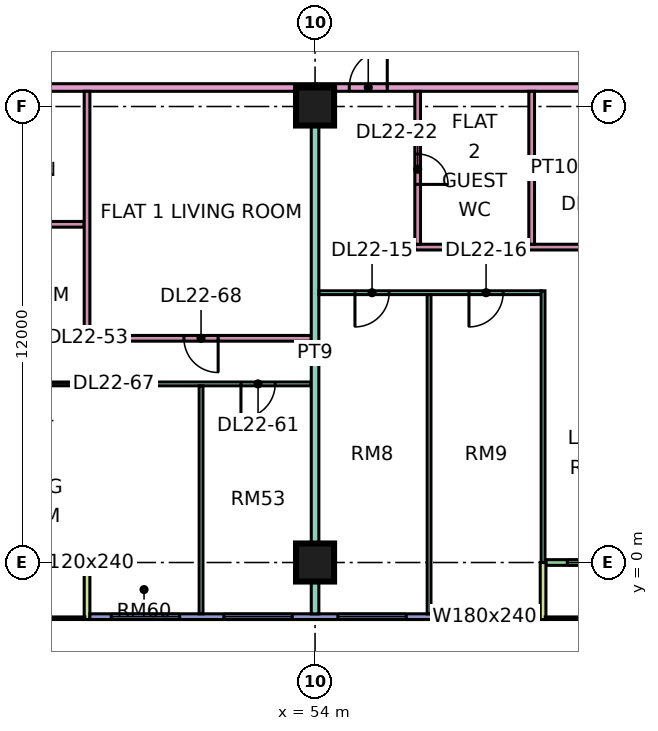
"""IFC4 building model, lengths in metres.
Left out: names, types, materials, properties, quantities, classifications, styles, units other than length and angle.
Written with IfcOpenShell. Run it as: python <this file> out.ifc"""

import sys

from ifc_helpers import new_model, si_unit, direction, frame, frame_2d, origin, origin_2d, place, context, subcontext, project, spatial, rectangle, extrude, element, fill, save


model = new_model("IFC4")
c1 = context("Model", 3, precision=1e-05, world=origin(), true_north=direction((0.0, 1.0)))
c2 = subcontext(c1, "Body", "Model", "MODEL_VIEW")
j1 = project(units=[si_unit("LENGTHUNIT", "METRE"), si_unit("PLANEANGLEUNIT", "RADIAN")], contexts=[c1])
p1 = place(None, origin())
s1 = spatial("IfcSite", under=j1, at=p1, CompositionType="ELEMENT")
p2 = place(p1, origin())
s2 = spatial("IfcBuilding", under=s1, at=p2, CompositionType="ELEMENT")
p3 = place(p2, frame((0.0, 0.0, 99.4)))
s3 = spatial("IfcBuildingStorey", under=s2, at=p3, CompositionType="ELEMENT", Elevation=99.4)
for number, where, z_axis, x_axis in (
    (1, (54.0, 0.0, 0.0), (0.0, 0.0, 1.0), (1.0, 0.0, 0.0)),
    (2, (54.0, 12.0, 0.0), (0.0, 0.0, 1.0), (1.0, 0.0, 0.0)),
):
    element("IfcColumn", number, at=place(p3, frame(where, z_axis=z_axis, x_axis=x_axis)), inside=s3, PredefinedType="COLUMN", context=c2, shape_type="SweptSolid", body=[
        extrude(rectangle(XDim=1.0, YDim=1.0, at=origin_2d()), origin(), (0.0, 0.0, 1.0), 3.75),
    ])
p4 = place(p3, frame((36.075, 0.0, 0.0), z_axis=(0.0, 0.0, 1.0), x_axis=(1.0, 0.0, 0.0)))
e3 = element("IfcWall", 3, at=p4, inside=s3, PredefinedType="SOLIDWALL", context=c2, shape_type="SweptSolid", body=[
    extrude(rectangle(XDim=11.85, YDim=0.15, at=frame_2d((5.925, 0.0))), origin(), (0.0, 0.0, 1.0), 3.35),
])
p5 = place(p4, frame((1.125, 0.0, 0.0)))
e4 = element("IfcOpeningElement", 4, at=p5, cuts=e3, PredefinedType="OPENING", context=c2, shape_type="SweptSolid", body=[
    extrude(rectangle(XDim=1.2, YDim=2.4, at=frame_2d((0.6, 1.2))), frame((0.0, 0.085, 0.0), z_axis=(0.0, -1.0, 0.0), x_axis=(1.0, 0.0, 0.0)), (0.0, 0.0, 1.0), 0.17),
])
p6 = place(p4, frame((3.525, 0.0, 0.45)))
e5 = element("IfcOpeningElement", 5, at=p6, cuts=e3, PredefinedType="OPENING", context=c2, shape_type="SweptSolid", body=[
    extrude(rectangle(XDim=1.8, YDim=2.4, at=frame_2d((0.9, 1.2))), frame((0.0, 0.085, 0.0), z_axis=(0.0, -1.0, 0.0), x_axis=(1.0, 0.0, 0.0)), (0.0, 0.0, 1.0), 0.17),
])
p7 = place(p4, frame((6.525, 0.0, 0.45)))
e6 = element("IfcOpeningElement", 6, at=p7, cuts=e3, PredefinedType="OPENING", context=c2, shape_type="SweptSolid", body=[
    extrude(rectangle(XDim=1.2, YDim=2.4, at=frame_2d((0.6, 1.2))), frame((0.0, 0.085, 0.0), z_axis=(0.0, -1.0, 0.0), x_axis=(1.0, 0.0, 0.0)), (0.0, 0.0, 1.0), 0.17),
])
p8 = place(p4, frame((10.087, 0.0, 0.45)))
e7 = element("IfcOpeningElement", 7, at=p8, cuts=e3, PredefinedType="OPENING", context=c2, shape_type="SweptSolid", body=[
    extrude(rectangle(XDim=1.2, YDim=2.4, at=frame_2d((0.6, 1.2))), frame((0.0, 0.085, 0.0), z_axis=(0.0, -1.0, 0.0), x_axis=(1.0, 0.0, 0.0)), (0.0, 0.0, 1.0), 0.17),
])
p9 = place(p3, frame((48.0, -1.5, 0.0), z_axis=(0.0, 0.0, 1.0), x_axis=(0.0, 1.0, 0.0)))
e8 = element("IfcWall", 8, at=p9, inside=s3, PredefinedType="SOLIDWALL", context=c2, shape_type="SweptSolid", body=[
    extrude(rectangle(XDim=1.5, YDim=0.15, at=frame_2d((0.75, 0.0))), origin(), (0.0, 0.0, 1.0), 3.35),
])
p10 = place(p3, frame((48.075, -1.425, 0.0), z_axis=(0.0, 0.0, 1.0), x_axis=(1.0, 0.0, 0.0)))
e9 = element("IfcWall", 9, at=p10, inside=s3, PredefinedType="SOLIDWALL", context=c2, shape_type="SweptSolid", body=[
    extrude(rectangle(XDim=11.85, YDim=0.15, at=frame_2d((5.925, 0.0))), origin(), (0.0, 0.0, 1.0), 3.35),
])
p11 = place(p10, frame((0.562, 0.0, 0.45)))
e10 = element("IfcOpeningElement", 10, at=p11, cuts=e9, PredefinedType="OPENING", context=c2, shape_type="SweptSolid", body=[
    extrude(rectangle(XDim=1.8, YDim=2.4, at=frame_2d((0.9, 1.2))), frame((0.0, 0.085, 0.0), z_axis=(0.0, -1.0, 0.0), x_axis=(1.0, 0.0, 0.0)), (0.0, 0.0, 1.0), 0.17),
])
p12 = place(p10, frame((3.525, 0.0, 0.45)))
e11 = element("IfcOpeningElement", 11, at=p12, cuts=e9, PredefinedType="OPENING", context=c2, shape_type="SweptSolid", body=[
    extrude(rectangle(XDim=1.8, YDim=2.4, at=frame_2d((0.9, 1.2))), frame((0.0, 0.085, 0.0), z_axis=(0.0, -1.0, 0.0), x_axis=(1.0, 0.0, 0.0)), (0.0, 0.0, 1.0), 0.17),
])
p13 = place(p10, frame((6.525, 0.0, 0.45)))
e12 = element("IfcOpeningElement", 12, at=p13, cuts=e9, PredefinedType="OPENING", context=c2, shape_type="SweptSolid", body=[
    extrude(rectangle(XDim=1.8, YDim=2.4, at=frame_2d((0.9, 1.2))), frame((0.0, 0.085, 0.0), z_axis=(0.0, -1.0, 0.0), x_axis=(1.0, 0.0, 0.0)), (0.0, 0.0, 1.0), 0.17),
])
p14 = place(p10, frame((9.488, 0.0, 0.45)))
e13 = element("IfcOpeningElement", 13, at=p14, cuts=e9, PredefinedType="OPENING", context=c2, shape_type="SweptSolid", body=[
    extrude(rectangle(XDim=1.8, YDim=2.4, at=frame_2d((0.9, 1.2))), frame((0.0, 0.085, 0.0), z_axis=(0.0, -1.0, 0.0), x_axis=(1.0, 0.0, 0.0)), (0.0, 0.0, 1.0), 0.17),
])
p15 = place(p3, frame((60.075, 0.0, 0.0), z_axis=(0.0, 0.0, 1.0), x_axis=(1.0, 0.0, 0.0)))
e14 = element("IfcWall", 14, at=p15, inside=s3, PredefinedType="SOLIDWALL", context=c2, shape_type="SweptSolid", body=[
    extrude(rectangle(XDim=10.35, YDim=0.15, at=frame_2d((5.175, 0.0))), origin(), (0.0, 0.0, 1.0), 3.35),
])
p16 = place(p15, frame((0.562, 0.0, 0.45)))
e15 = element("IfcOpeningElement", 15, at=p16, cuts=e14, PredefinedType="OPENING", context=c2, shape_type="SweptSolid", body=[
    extrude(rectangle(XDim=1.2, YDim=2.4, at=frame_2d((0.6, 1.2))), frame((0.0, 0.085, 0.0), z_axis=(0.0, -1.0, 0.0), x_axis=(1.0, 0.0, 0.0)), (0.0, 0.0, 1.0), 0.17),
])
p17 = place(p15, frame((4.125, 0.0, 0.0)))
e16 = element("IfcOpeningElement", 16, at=p17, cuts=e14, PredefinedType="OPENING", context=c2, shape_type="SweptSolid", body=[
    extrude(rectangle(XDim=1.2, YDim=2.4, at=frame_2d((0.6, 1.2))), frame((0.0, 0.085, 0.0), z_axis=(0.0, -1.0, 0.0), x_axis=(1.0, 0.0, 0.0)), (0.0, 0.0, 1.0), 0.17),
])
p18 = place(p15, frame((6.525, 0.0, 0.45)))
e17 = element("IfcOpeningElement", 17, at=p18, cuts=e14, PredefinedType="OPENING", context=c2, shape_type="SweptSolid", body=[
    extrude(rectangle(XDim=1.8, YDim=2.4, at=frame_2d((0.9, 1.2))), frame((0.0, 0.085, 0.0), z_axis=(0.0, -1.0, 0.0), x_axis=(1.0, 0.0, 0.0)), (0.0, 0.0, 1.0), 0.17),
])
p19 = place(p15, frame((9.188, 0.0, 0.45)))
e18 = element("IfcOpeningElement", 18, at=p19, cuts=e14, PredefinedType="OPENING", context=c2, shape_type="SweptSolid", body=[
    extrude(rectangle(XDim=0.9, YDim=2.4, at=frame_2d((0.45, 1.2))), frame((0.0, 0.085, 0.0), z_axis=(0.0, -1.0, 0.0), x_axis=(1.0, 0.0, 0.0)), (0.0, 0.0, 1.0), 0.17),
])
p20 = place(p3, frame((60.0, -1.5, 0.0), z_axis=(0.0, 0.0, 1.0), x_axis=(0.0, 1.0, 0.0)))
e19 = element("IfcWall", 19, at=p20, inside=s3, PredefinedType="SOLIDWALL", context=c2, shape_type="SweptSolid", body=[
    extrude(rectangle(XDim=1.5, YDim=0.15, at=frame_2d((0.75, 0.0))), origin(), (0.0, 0.0, 1.0), 3.35),
])
p21 = place(p3, frame((33.05, 4.7, 0.0), z_axis=(0.0, 0.0, 1.0), x_axis=(1.0, 0.0, 0.0)))
e20 = element("IfcWall", 20, at=p21, inside=s3, PredefinedType="PARTITIONING", context=c2, shape_type="SweptSolid", body=[
    extrude(rectangle(XDim=20.85, YDim=0.1, at=frame_2d((10.425, 0.0))), origin(), (0.0, 0.0, 1.0), 3.35),
])
p22 = place(p21, frame((1.0, 0.0, 0.0)))
e21 = element("IfcOpeningElement", 21, at=p22, cuts=e20, PredefinedType="OPENING", context=c2, shape_type="SweptSolid", body=[
    extrude(rectangle(XDim=0.9, YDim=2.1, at=frame_2d((0.45, 1.05))), frame((0.0, 0.06, 0.0), z_axis=(0.0, -1.0, 0.0), x_axis=(1.0, 0.0, 0.0)), (0.0, 0.0, 1.0), 0.12),
])
p23 = place(p21, frame((4.0, 0.0, 0.0)))
e22 = element("IfcOpeningElement", 22, at=p23, cuts=e20, PredefinedType="OPENING", context=c2, shape_type="SweptSolid", body=[
    extrude(rectangle(XDim=0.9, YDim=2.1, at=frame_2d((0.45, 1.05))), frame((0.0, 0.06, 0.0), z_axis=(0.0, -1.0, 0.0), x_axis=(1.0, 0.0, 0.0)), (0.0, 0.0, 1.0), 0.12),
])
p24 = place(p21, frame((7.0, 0.0, 0.0)))
e23 = element("IfcOpeningElement", 23, at=p24, cuts=e20, PredefinedType="OPENING", context=c2, shape_type="SweptSolid", body=[
    extrude(rectangle(XDim=0.9, YDim=2.1, at=frame_2d((0.45, 1.05))), frame((0.0, 0.06, 0.0), z_axis=(0.0, -1.0, 0.0), x_axis=(1.0, 0.0, 0.0)), (0.0, 0.0, 1.0), 0.12),
])
p25 = place(p21, frame((19.0, 0.0, 0.0)))
e24 = element("IfcOpeningElement", 24, at=p25, cuts=e20, PredefinedType="OPENING", context=c2, shape_type="SweptSolid", body=[
    extrude(rectangle(XDim=0.9, YDim=2.1, at=frame_2d((0.45, 1.05))), frame((0.0, 0.06, 0.0), z_axis=(0.0, -1.0, 0.0), x_axis=(1.0, 0.0, 0.0)), (0.0, 0.0, 1.0), 0.12),
])
p26 = place(p21, frame((13.0, 0.0, 0.0)))
e25 = element("IfcOpeningElement", 25, at=p26, cuts=e20, PredefinedType="OPENING", context=c2, shape_type="SweptSolid", body=[
    extrude(rectangle(XDim=0.9, YDim=2.1, at=frame_2d((0.45, 1.05))), frame((0.0, 0.06, 0.0), z_axis=(0.0, -1.0, 0.0), x_axis=(1.0, 0.0, 0.0)), (0.0, 0.0, 1.0), 0.12),
])
p27 = place(p3, frame((40.65, 12.5, 0.0), z_axis=(0.0, 0.0, 1.0), x_axis=(1.0, 0.0, 0.0)))
e26 = element("IfcWall", 26, at=p27, inside=s3, PredefinedType="PARTITIONING", context=c2, shape_type="SweptSolid", body=[
    extrude(rectangle(XDim=31.276, YDim=0.2, at=frame_2d((15.638, 0.0))), origin(), (0.0, 0.0, 1.0), 3.35),
])
p28 = place(p27, frame((14.25, 0.0, 0.0)))
e27 = element("IfcOpeningElement", 27, at=p28, cuts=e26, PredefinedType="OPENING", context=c2, shape_type="SweptSolid", body=[
    extrude(rectangle(XDim=1.0, YDim=2.1, at=frame_2d((0.5, 1.05))), frame((0.0, 0.11, 0.0), z_axis=(0.0, -1.0, 0.0), x_axis=(1.0, 0.0, 0.0)), (0.0, 0.0, 1.0), 0.22),
])
p29 = place(p27, frame((1.05, 0.0, 0.0)))
e28 = element("IfcOpeningElement", 28, at=p29, cuts=e26, PredefinedType="OPENING", context=c2, shape_type="SweptSolid", body=[
    extrude(rectangle(XDim=1.0, YDim=2.1, at=frame_2d((0.5, 1.05))), frame((0.0, 0.11, 0.0), z_axis=(0.0, -1.0, 0.0), x_axis=(1.0, 0.0, 0.0)), (0.0, 0.0, 1.0), 0.22),
])
p30 = place(p3, frame((43.575, 5.9, 0.0), z_axis=(0.0, 0.0, 1.0), x_axis=(1.0, 0.0, 0.0)))
e29 = element("IfcWall", 29, at=p30, inside=s3, PredefinedType="PARTITIONING", context=c2, shape_type="SweptSolid", body=[
    extrude(rectangle(XDim=10.325, YDim=0.15, at=frame_2d((5.163, 0.0))), origin(), (0.0, 0.0, 1.0), 3.35),
])
p31 = place(p30, frame((1.825, 0.0, 0.0)))
e30 = element("IfcOpeningElement", 30, at=p31, cuts=e29, PredefinedType="OPENING", context=c2, shape_type="SweptSolid", body=[
    extrude(rectangle(XDim=0.8, YDim=2.1, at=frame_2d((0.4, 1.05))), frame((0.0, 0.085, 0.0), z_axis=(0.0, -1.0, 0.0), x_axis=(1.0, 0.0, 0.0)), (0.0, 0.0, 1.0), 0.17),
])
p32 = place(p30, frame((6.975, 0.0, 0.0)))
e31 = element("IfcOpeningElement", 31, at=p32, cuts=e29, PredefinedType="OPENING", context=c2, shape_type="SweptSolid", body=[
    extrude(rectangle(XDim=0.9, YDim=2.1, at=frame_2d((0.45, 1.05))), frame((0.0, 0.085, 0.0), z_axis=(0.0, -1.0, 0.0), x_axis=(1.0, 0.0, 0.0)), (0.0, 0.0, 1.0), 0.17),
])
p33 = place(p3, frame((43.725, 8.9, 0.0), z_axis=(0.0, 0.0, 1.0), x_axis=(1.0, 0.0, 0.0)))
e32 = element("IfcWall", 32, at=p33, inside=s3, PredefinedType="PARTITIONING", context=c2, shape_type="SweptSolid", body=[
    extrude(rectangle(XDim=4.2, YDim=0.15, at=frame_2d((2.1, 0.0))), origin(), (0.0, 0.0, 1.0), 3.35),
])
p34 = place(p3, frame((48.0, 5.975, 0.0), z_axis=(0.0, 0.0, 1.0), x_axis=(0.0, 1.0, 0.0)))
e33 = element("IfcWall", 33, at=p34, inside=s3, PredefinedType="PARTITIONING", context=c2, shape_type="SweptSolid", body=[
    extrude(rectangle(XDim=6.425, YDim=0.15, at=frame_2d((3.212, 0.0))), origin(), (0.0, 0.0, 1.0), 3.35),
])
p35 = place(p3, frame((51.0, -1.35, 0.0), z_axis=(0.0, 0.0, 1.0), x_axis=(0.0, 1.0, 0.0)))
e34 = element("IfcWall", 34, at=p35, inside=s3, PredefinedType="PARTITIONING", context=c2, shape_type="SweptSolid", body=[
    extrude(rectangle(XDim=6.0, YDim=0.1, at=frame_2d((3.0, 0.0))), origin(), (0.0, 0.0, 1.0), 3.35),
])
p36 = place(p3, frame((54.0, -1.351, 0.0), z_axis=(0.0, 0.0, 1.0), x_axis=(0.0, 1.0, 0.0)))
e35 = element("IfcWall", 35, at=p36, inside=s3, PredefinedType="PARTITIONING", context=c2, shape_type="SweptSolid", body=[
    extrude(rectangle(XDim=13.751, YDim=0.2, at=frame_2d((6.875, 0.0))), origin(), (0.0, 0.0, 1.0), 3.35),
])
p37 = place(p3, frame((54.1, 7.1, 0.0), z_axis=(0.0, 0.0, 1.0), x_axis=(1.0, 0.0, 0.0)))
e36 = element("IfcWall", 36, at=p37, inside=s3, PredefinedType="PARTITIONING", context=c2, shape_type="SweptSolid", body=[
    extrude(rectangle(XDim=5.85, YDim=0.1, at=frame_2d((2.925, 0.0))), origin(), (0.0, 0.0, 1.0), 3.35),
])
p38 = place(p37, frame((0.95, 0.0, 0.0)))
e37 = element("IfcOpeningElement", 37, at=p38, cuts=e36, PredefinedType="OPENING", context=c2, shape_type="SweptSolid", body=[
    extrude(rectangle(XDim=0.9, YDim=2.1, at=frame_2d((0.45, 1.05))), frame((0.0, 0.06, 0.0), z_axis=(0.0, -1.0, 0.0), x_axis=(1.0, 0.0, 0.0)), (0.0, 0.0, 1.0), 0.12),
])
p39 = place(p37, frame((3.95, 0.0, 0.0)))
e38 = element("IfcOpeningElement", 38, at=p39, cuts=e36, PredefinedType="OPENING", context=c2, shape_type="SweptSolid", body=[
    extrude(rectangle(XDim=0.9, YDim=2.1, at=frame_2d((0.45, 1.05))), frame((0.0, 0.06, 0.0), z_axis=(0.0, -1.0, 0.0), x_axis=(1.0, 0.0, 0.0)), (0.0, 0.0, 1.0), 0.12),
])
p40 = place(p3, frame((56.625, 8.3, 0.0), z_axis=(0.0, 0.0, 1.0), x_axis=(1.0, 0.0, 0.0)))
e39 = element("IfcWall", 39, at=p40, inside=s3, PredefinedType="PARTITIONING", context=c2, shape_type="SweptSolid", body=[
    extrude(rectangle(XDim=16.725, YDim=0.15, at=frame_2d((8.363, 0.0))), origin(), (0.0, 0.0, 1.0), 3.35),
])
p41 = place(p40, frame((4.525, 0.0, 0.0)))
e40 = element("IfcOpeningElement", 40, at=p41, cuts=e39, PredefinedType="OPENING", context=c2, shape_type="SweptSolid", body=[
    extrude(rectangle(XDim=0.8, YDim=2.1, at=frame_2d((0.4, 1.05))), frame((0.0, 0.085, 0.0), z_axis=(0.0, -1.0, 0.0), x_axis=(1.0, 0.0, 0.0)), (0.0, 0.0, 1.0), 0.17),
])
p42 = place(p40, frame((11.625, 0.0, 0.0)))
e41 = element("IfcOpeningElement", 41, at=p42, cuts=e39, PredefinedType="OPENING", context=c2, shape_type="SweptSolid", body=[
    extrude(rectangle(XDim=0.9, YDim=2.1, at=frame_2d((0.45, 1.05))), frame((0.0, 0.085, 0.0), z_axis=(0.0, -1.0, 0.0), x_axis=(1.0, 0.0, 0.0)), (0.0, 0.0, 1.0), 0.17),
])
p43 = place(p40, frame((7.375, 0.0, 0.0)))
e42 = element("IfcOpeningElement", 42, at=p43, cuts=e39, PredefinedType="OPENING", context=c2, shape_type="SweptSolid", body=[
    extrude(rectangle(XDim=0.8, YDim=2.1, at=frame_2d((0.4, 1.05))), frame((0.0, 0.085, 0.0), z_axis=(0.0, -1.0, 0.0), x_axis=(1.0, 0.0, 0.0)), (0.0, 0.0, 1.0), 0.17),
])
p44 = place(p3, frame((56.7, 8.375, 0.0), z_axis=(0.0, 0.0, 1.0), x_axis=(0.0, 1.0, 0.0)))
e43 = element("IfcWall", 43, at=p44, inside=s3, PredefinedType="PARTITIONING", context=c2, shape_type="SweptSolid", body=[
    extrude(rectangle(XDim=4.025, YDim=0.15, at=frame_2d((2.012, 0.0))), origin(), (0.0, 0.0, 1.0), 3.35),
])
p45 = place(p44, frame((1.575, 0.0, 0.0)))
e44 = element("IfcOpeningElement", 44, at=p45, cuts=e43, PredefinedType="OPENING", context=c2, shape_type="SweptSolid", body=[
    extrude(rectangle(XDim=0.8, YDim=2.1, at=frame_2d((0.4, 1.05))), frame((0.0, 0.085, 0.0), z_axis=(0.0, -1.0, 0.0), x_axis=(1.0, 0.0, 0.0)), (0.0, 0.0, 1.0), 0.17),
])
p46 = place(p3, frame((57.0, -1.351, 0.0), z_axis=(0.0, 0.0, 1.0), x_axis=(0.0, 1.0, 0.0)))
e45 = element("IfcWall", 45, at=p46, inside=s3, PredefinedType="PARTITIONING", context=c2, shape_type="SweptSolid", body=[
    extrude(rectangle(XDim=8.401, YDim=0.1, at=frame_2d((4.201, 0.0))), origin(), (0.0, 0.0, 1.0), 3.35),
])
p47 = place(p3, frame((59.7, 8.375, 0.0), z_axis=(0.0, 0.0, 1.0), x_axis=(0.0, 1.0, 0.0)))
e46 = element("IfcWall", 46, at=p47, inside=s3, PredefinedType="PARTITIONING", context=c2, shape_type="SweptSolid", body=[
    extrude(rectangle(XDim=4.025, YDim=0.15, at=frame_2d((2.012, 0.0))), origin(), (0.0, 0.0, 1.0), 3.35),
])
p48 = place(p3, frame((60.0, 0.0, 0.0), z_axis=(0.0, 0.0, 1.0), x_axis=(0.0, 1.0, 0.0)))
e47 = element("IfcWall", 47, at=p48, inside=s3, PredefinedType="PARTITIONING", context=c2, shape_type="SweptSolid", body=[
    extrude(rectangle(XDim=7.15, YDim=0.1, at=frame_2d((3.575, 0.0))), origin(), (0.0, 0.0, 1.0), 3.35),
])
p49 = place(p8, origin())
e48 = element("IfcWindow", 48, at=p49, inside=s3, PartitioningType="SINGLE_PANEL", PredefinedType="WINDOW", context=c2, shape_type="SweptSolid", body=[
    extrude(rectangle(XDim=1.2, YDim=2.4, at=frame_2d((0.6, 1.2))), frame((0.0, 0.03, 0.0), z_axis=(0.0, -1.0, 0.0), x_axis=(1.0, 0.0, 0.0)), (0.0, 0.0, 1.0), 0.06),
])
fill(e7, e48)
p50 = place(p11, origin())
e49 = element("IfcWindow", 49, at=p50, inside=s3, PartitioningType="SINGLE_PANEL", PredefinedType="WINDOW", context=c2, shape_type="SweptSolid", body=[
    extrude(rectangle(XDim=1.8, YDim=2.4, at=frame_2d((0.9, 1.2))), frame((0.0, 0.03, 0.0), z_axis=(0.0, -1.0, 0.0), x_axis=(1.0, 0.0, 0.0)), (0.0, 0.0, 1.0), 0.06),
])
fill(e10, e49)
p51 = place(p12, origin())
e50 = element("IfcWindow", 50, at=p51, inside=s3, PartitioningType="SINGLE_PANEL", PredefinedType="WINDOW", context=c2, shape_type="SweptSolid", body=[
    extrude(rectangle(XDim=1.8, YDim=2.4, at=frame_2d((0.9, 1.2))), frame((0.0, 0.03, 0.0), z_axis=(0.0, -1.0, 0.0), x_axis=(1.0, 0.0, 0.0)), (0.0, 0.0, 1.0), 0.06),
])
fill(e11, e50)
p52 = place(p13, origin())
e51 = element("IfcWindow", 51, at=p52, inside=s3, PartitioningType="SINGLE_PANEL", PredefinedType="WINDOW", context=c2, shape_type="SweptSolid", body=[
    extrude(rectangle(XDim=1.8, YDim=2.4, at=frame_2d((0.9, 1.2))), frame((0.0, 0.03, 0.0), z_axis=(0.0, -1.0, 0.0), x_axis=(1.0, 0.0, 0.0)), (0.0, 0.0, 1.0), 0.06),
])
fill(e12, e51)
p53 = place(p14, origin())
e52 = element("IfcWindow", 52, at=p53, inside=s3, PartitioningType="SINGLE_PANEL", PredefinedType="WINDOW", context=c2, shape_type="SweptSolid", body=[
    extrude(rectangle(XDim=1.8, YDim=2.4, at=frame_2d((0.9, 1.2))), frame((0.0, 0.03, 0.0), z_axis=(0.0, -1.0, 0.0), x_axis=(1.0, 0.0, 0.0)), (0.0, 0.0, 1.0), 0.06),
])
fill(e13, e52)
p54 = place(p16, origin())
e53 = element("IfcWindow", 53, at=p54, inside=s3, PartitioningType="SINGLE_PANEL", PredefinedType="WINDOW", context=c2, shape_type="SweptSolid", body=[
    extrude(rectangle(XDim=1.2, YDim=2.4, at=frame_2d((0.6, 1.2))), frame((0.0, 0.03, 0.0), z_axis=(0.0, -1.0, 0.0), x_axis=(1.0, 0.0, 0.0)), (0.0, 0.0, 1.0), 0.06),
])
fill(e15, e53)
p55 = place(p38, frame((0.9, 0.0, 0.0), z_axis=(0.0, 0.0, 1.0), x_axis=(-1.0, 0.0, 0.0)))
e54 = element("IfcDoor", 54, at=p55, inside=s3, OperationType="SINGLE_SWING_LEFT", PredefinedType="DOOR", context=c2, shape_type="SweptSolid", body=[
    extrude(rectangle(XDim=0.9, YDim=2.1, at=frame_2d((0.45, 1.05))), frame((0.0, 0.025, 0.0), z_axis=(0.0, -1.0, 0.0), x_axis=(1.0, 0.0, 0.0)), (0.0, 0.0, 1.0), 0.05),
])
fill(e37, e54)
p56 = place(p39, frame((0.9, 0.0, 0.0), z_axis=(0.0, 0.0, 1.0), x_axis=(-1.0, 0.0, 0.0)))
e55 = element("IfcDoor", 55, at=p56, inside=s3, OperationType="SINGLE_SWING_LEFT", PredefinedType="DOOR", context=c2, shape_type="SweptSolid", body=[
    extrude(rectangle(XDim=0.9, YDim=2.1, at=frame_2d((0.45, 1.05))), frame((0.0, 0.025, 0.0), z_axis=(0.0, -1.0, 0.0), x_axis=(1.0, 0.0, 0.0)), (0.0, 0.0, 1.0), 0.05),
])
fill(e38, e55)
p57 = place(p28, frame((1.0, 0.0, 0.0), z_axis=(0.0, 0.0, 1.0), x_axis=(-1.0, 0.0, 0.0)))
e56 = element("IfcDoor", 56, at=p57, inside=s3, OperationType="SINGLE_SWING_RIGHT", PredefinedType="DOOR", context=c2, shape_type="SweptSolid", body=[
    extrude(rectangle(XDim=1.0, YDim=2.1, at=frame_2d((0.5, 1.05))), frame((0.0, 0.025, 0.0), z_axis=(0.0, -1.0, 0.0), x_axis=(1.0, 0.0, 0.0)), (0.0, 0.0, 1.0), 0.05),
])
fill(e27, e56)
p58 = place(p45, frame((0.8, 0.0, 0.0), z_axis=(0.0, 0.0, 1.0), x_axis=(-1.0, 0.0, 0.0)))
e57 = element("IfcDoor", 57, at=p58, inside=s3, OperationType="SINGLE_SWING_LEFT", PredefinedType="DOOR", context=c2, shape_type="SweptSolid", body=[
    extrude(rectangle(XDim=0.8, YDim=2.1, at=frame_2d((0.4, 1.05))), frame((0.0, 0.025, 0.0), z_axis=(0.0, -1.0, 0.0), x_axis=(1.0, 0.0, 0.0)), (0.0, 0.0, 1.0), 0.05),
])
fill(e44, e57)
p59 = place(p25, frame((0.9, 0.0, 0.0), z_axis=(0.0, 0.0, 1.0), x_axis=(-1.0, 0.0, 0.0)))
e58 = element("IfcDoor", 58, at=p59, inside=s3, OperationType="SINGLE_SWING_LEFT", PredefinedType="DOOR", context=c2, shape_type="SweptSolid", body=[
    extrude(rectangle(XDim=0.9, YDim=2.1, at=frame_2d((0.45, 1.05))), frame((0.0, 0.025, 0.0), z_axis=(0.0, -1.0, 0.0), x_axis=(1.0, 0.0, 0.0)), (0.0, 0.0, 1.0), 0.05),
])
fill(e24, e58)
p60 = place(p32, origin())
e59 = element("IfcDoor", 59, at=p60, inside=s3, OperationType="SINGLE_SWING_RIGHT", PredefinedType="DOOR", context=c2, shape_type="SweptSolid", body=[
    extrude(rectangle(XDim=0.9, YDim=2.1, at=frame_2d((0.45, 1.05))), frame((0.0, 0.025, 0.0), z_axis=(0.0, -1.0, 0.0), x_axis=(1.0, 0.0, 0.0)), (0.0, 0.0, 1.0), 0.05),
])
fill(e31, e59)
save(model, sys.argv[1])
